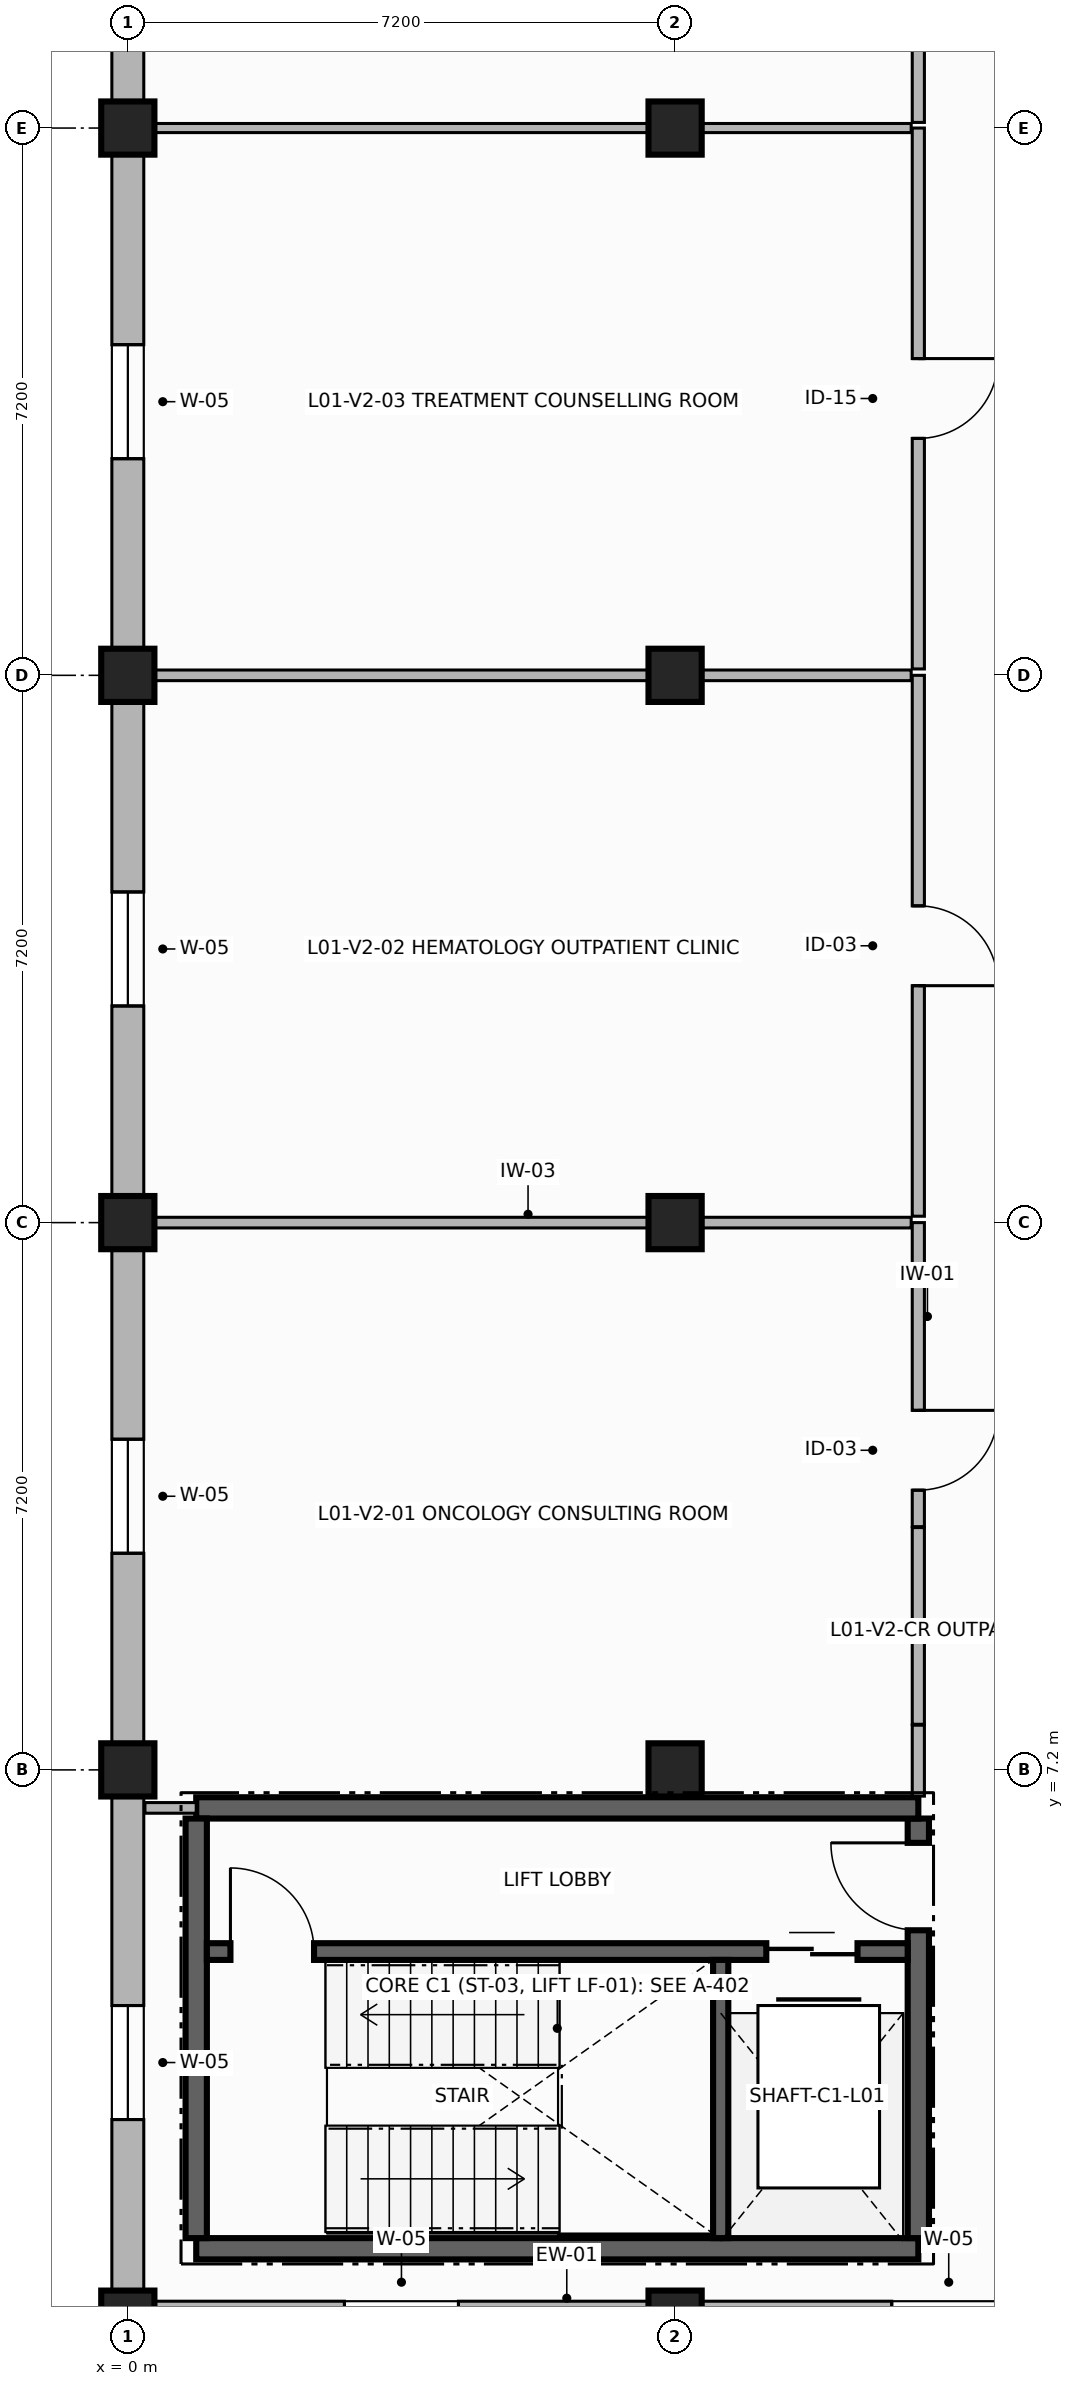
"""IFC4 building model, lengths in metres.
Left out: names, types, materials, properties, quantities, classifications, styles, units other than length and angle.
Written with IfcOpenShell. Run it as: python <this file> out.ifc"""

import sys

from ifc_helpers import new_model, si_unit, direction, frame, frame_2d, origin, origin_with_axes, origin_2d, place, context, subcontext, project, spatial, rectangle, extrude, element, fill, save


model = new_model("IFC4")
c1 = context("Model", 3, precision=1e-05, world=origin(), true_north=direction((0.0, 1.0)))
c2 = subcontext(c1, "Body", "Model", "MODEL_VIEW")
j1 = project(units=[si_unit("LENGTHUNIT", "METRE"), si_unit("PLANEANGLEUNIT", "RADIAN")], contexts=[c1])
p1 = place(None, origin())
s1 = spatial("IfcSite", under=j1, at=p1, CompositionType="ELEMENT")
p2 = place(p1, origin())
s2 = spatial("IfcBuilding", under=s1, at=p2, CompositionType="ELEMENT")
p3 = place(p2, frame((0.0, 0.0, 4.5)))
s3 = spatial("IfcBuildingStorey", under=s2, at=p3, CompositionType="ELEMENT", Elevation=4.5)
for number, where, z_axis, x_axis in (
    (1, (0.0, 0.0, 0.0), (0.0, 0.0, 1.0), (1.0, 0.0, 0.0)),
    (2, (0.0, 7.2, 0.0), (0.0, 0.0, 1.0), (1.0, 0.0, 0.0)),
    (3, (0.0, 14.4, 0.0), (0.0, 0.0, 1.0), (1.0, 0.0, 0.0)),
    (4, (0.0, 21.6, 0.0), (0.0, 0.0, 1.0), (1.0, 0.0, 0.0)),
    (5, (0.0, 28.8, 0.0), (0.0, 0.0, 1.0), (1.0, 0.0, 0.0)),
    (6, (7.2, 0.0, 0.0), (0.0, 0.0, 1.0), (1.0, 0.0, 0.0)),
    (7, (7.2, 7.2, 0.0), (0.0, 0.0, 1.0), (1.0, 0.0, 0.0)),
    (8, (7.2, 14.4, 0.0), (0.0, 0.0, 1.0), (1.0, 0.0, 0.0)),
    (9, (7.2, 21.6, 0.0), (0.0, 0.0, 1.0), (1.0, 0.0, 0.0)),
    (10, (7.2, 28.8, 0.0), (0.0, 0.0, 1.0), (1.0, 0.0, 0.0)),
):
    element("IfcColumn", number, at=place(p3, frame(where, z_axis=z_axis, x_axis=x_axis)), inside=s3, PredefinedType="COLUMN", context=c2, shape_type="SweptSolid", body=[
        extrude(rectangle(XDim=0.7, YDim=0.7, at=origin_2d()), origin(), (0.0, 0.0, 1.0), 3.62),
    ])
p4 = place(p3, origin_with_axes())
e11 = element("IfcWall", 11, at=p4, inside=s3, PredefinedType="SOLIDWALL", context=c2, shape_type="SweptSolid", body=[
    extrude(rectangle(XDim=7.2, YDim=0.42, at=frame_2d((3.6, 0.0))), origin(), (0.0, 0.0, 1.0), 3.0),
])
p5 = place(p4, frame((2.85, 0.0, 0.85)))
e12 = element("IfcOpeningElement", 12, at=p5, cuts=e11, PredefinedType="OPENING", context=c2, shape_type="SweptSolid", body=[
    extrude(rectangle(XDim=1.5, YDim=1.9, at=frame_2d((0.75, 0.95))), frame((0.0, 0.22, 0.0), z_axis=(0.0, -1.0, 0.0), x_axis=(1.0, 0.0, 0.0)), (0.0, 0.0, 1.0), 0.44),
])
p6 = place(p3, frame((7.2, 0.0, 0.0), z_axis=(0.0, 0.0, 1.0), x_axis=(1.0, 0.0, 0.0)))
e13 = element("IfcWall", 13, at=p6, inside=s3, PredefinedType="SOLIDWALL", context=c2, shape_type="SweptSolid", body=[
    extrude(rectangle(XDim=7.2, YDim=0.42, at=frame_2d((3.6, 0.0))), origin(), (0.0, 0.0, 1.0), 3.0),
])
p7 = place(p6, frame((2.85, 0.0, 0.85)))
e14 = element("IfcOpeningElement", 14, at=p7, cuts=e13, PredefinedType="OPENING", context=c2, shape_type="SweptSolid", body=[
    extrude(rectangle(XDim=1.5, YDim=1.9, at=frame_2d((0.75, 0.95))), frame((0.0, 0.22, 0.0), z_axis=(0.0, -1.0, 0.0), x_axis=(1.0, 0.0, 0.0)), (0.0, 0.0, 1.0), 0.44),
])
p8 = place(p3, frame((0.0, 36.0, 0.0), z_axis=(0.0, 0.0, 1.0), x_axis=(0.0, -1.0, 0.0)))
e15 = element("IfcWall", 15, at=p8, inside=s3, PredefinedType="SOLIDWALL", context=c2, shape_type="SweptSolid", body=[
    extrude(rectangle(XDim=7.2, YDim=0.42, at=frame_2d((3.6, 0.0))), origin(), (0.0, 0.0, 1.0), 3.0),
])
p9 = place(p8, frame((2.85, 0.0, 0.85)))
e16 = element("IfcOpeningElement", 16, at=p9, cuts=e15, PredefinedType="OPENING", context=c2, shape_type="SweptSolid", body=[
    extrude(rectangle(XDim=1.5, YDim=1.9, at=frame_2d((0.75, 0.95))), frame((0.0, 0.22, 0.0), z_axis=(0.0, -1.0, 0.0), x_axis=(1.0, 0.0, 0.0)), (0.0, 0.0, 1.0), 0.44),
])
p10 = place(p3, frame((0.0, 28.8, 0.0), z_axis=(0.0, 0.0, 1.0), x_axis=(0.0, -1.0, 0.0)))
e17 = element("IfcWall", 17, at=p10, inside=s3, PredefinedType="SOLIDWALL", context=c2, shape_type="SweptSolid", body=[
    extrude(rectangle(XDim=7.2, YDim=0.42, at=frame_2d((3.6, 0.0))), origin(), (0.0, 0.0, 1.0), 3.0),
])
p11 = place(p10, frame((2.85, 0.0, 0.85)))
e18 = element("IfcOpeningElement", 18, at=p11, cuts=e17, PredefinedType="OPENING", context=c2, shape_type="SweptSolid", body=[
    extrude(rectangle(XDim=1.5, YDim=1.9, at=frame_2d((0.75, 0.95))), frame((0.0, 0.22, 0.0), z_axis=(0.0, -1.0, 0.0), x_axis=(1.0, 0.0, 0.0)), (0.0, 0.0, 1.0), 0.44),
])
p12 = place(p3, frame((0.0, 21.6, 0.0), z_axis=(0.0, 0.0, 1.0), x_axis=(0.0, -1.0, 0.0)))
e19 = element("IfcWall", 19, at=p12, inside=s3, PredefinedType="SOLIDWALL", context=c2, shape_type="SweptSolid", body=[
    extrude(rectangle(XDim=7.2, YDim=0.42, at=frame_2d((3.6, 0.0))), origin(), (0.0, 0.0, 1.0), 3.0),
])
p13 = place(p12, frame((2.85, 0.0, 0.85)))
e20 = element("IfcOpeningElement", 20, at=p13, cuts=e19, PredefinedType="OPENING", context=c2, shape_type="SweptSolid", body=[
    extrude(rectangle(XDim=1.5, YDim=1.9, at=frame_2d((0.75, 0.95))), frame((0.0, 0.22, 0.0), z_axis=(0.0, -1.0, 0.0), x_axis=(1.0, 0.0, 0.0)), (0.0, 0.0, 1.0), 0.44),
])
p14 = place(p3, frame((0.0, 14.4, 0.0), z_axis=(0.0, 0.0, 1.0), x_axis=(0.0, -1.0, 0.0)))
e21 = element("IfcWall", 21, at=p14, inside=s3, PredefinedType="SOLIDWALL", context=c2, shape_type="SweptSolid", body=[
    extrude(rectangle(XDim=7.2, YDim=0.42, at=frame_2d((3.6, 0.0))), origin(), (0.0, 0.0, 1.0), 3.0),
])
p15 = place(p14, frame((2.85, 0.0, 0.85)))
e22 = element("IfcOpeningElement", 22, at=p15, cuts=e21, PredefinedType="OPENING", context=c2, shape_type="SweptSolid", body=[
    extrude(rectangle(XDim=1.5, YDim=1.9, at=frame_2d((0.75, 0.95))), frame((0.0, 0.22, 0.0), z_axis=(0.0, -1.0, 0.0), x_axis=(1.0, 0.0, 0.0)), (0.0, 0.0, 1.0), 0.44),
])
p16 = place(p3, frame((0.0, 7.2, 0.0), z_axis=(0.0, 0.0, 1.0), x_axis=(0.0, -1.0, 0.0)))
e23 = element("IfcWall", 23, at=p16, inside=s3, PredefinedType="SOLIDWALL", context=c2, shape_type="SweptSolid", body=[
    extrude(rectangle(XDim=7.2, YDim=0.42, at=frame_2d((3.6, 0.0))), origin(), (0.0, 0.0, 1.0), 3.0),
])
p17 = place(p16, frame((3.1, 0.0, 0.85)))
e24 = element("IfcOpeningElement", 24, at=p17, cuts=e23, PredefinedType="OPENING", context=c2, shape_type="SweptSolid", body=[
    extrude(rectangle(XDim=1.5, YDim=1.9, at=frame_2d((0.75, 0.95))), frame((0.0, 0.22, 0.0), z_axis=(0.0, -1.0, 0.0), x_axis=(1.0, 0.0, 0.0)), (0.0, 0.0, 1.0), 0.44),
])
p18 = place(p3, frame((0.9, 0.9, 0.0), z_axis=(0.0, 0.0, 1.0), x_axis=(1.0, 0.0, 0.0)))
e25 = element("IfcWall", 25, at=p18, inside=s3, PredefinedType="SHEAR", context=c2, shape_type="SweptSolid", body=[
    extrude(rectangle(XDim=9.5, YDim=0.28, at=frame_2d((4.75, 0.0))), origin(), (0.0, 0.0, 1.0), 3.62),
])
p19 = place(p3, frame((10.4, 1.04, 0.0), z_axis=(0.0, 0.0, 1.0), x_axis=(0.0, 1.0, 0.0)))
e26 = element("IfcWall", 26, at=p19, inside=s3, PredefinedType="SHEAR", context=c2, shape_type="SweptSolid", body=[
    extrude(rectangle(XDim=5.52, YDim=0.28, at=frame_2d((2.76, 0.0))), origin(), (0.0, 0.0, 1.0), 3.62),
])
p20 = place(p19, frame((4.05, 0.0, 0.0)))
e27 = element("IfcOpeningElement", 27, at=p20, cuts=e26, PredefinedType="OPENING", context=c2, shape_type="SweptSolid", body=[
    extrude(rectangle(XDim=1.15, YDim=2.2, at=frame_2d((0.575, 1.1))), frame((0.0, 0.15, 0.0), z_axis=(0.0, -1.0, 0.0), x_axis=(1.0, 0.0, 0.0)), (0.0, 0.0, 1.0), 0.3),
])
p21 = place(p3, frame((10.4, 6.7, 0.0), z_axis=(0.0, 0.0, 1.0), x_axis=(-1.0, 0.0, 0.0)))
e28 = element("IfcWall", 28, at=p21, inside=s3, PredefinedType="SHEAR", context=c2, shape_type="SweptSolid", body=[
    extrude(rectangle(XDim=9.5, YDim=0.28, at=frame_2d((4.75, 0.0))), origin(), (0.0, 0.0, 1.0), 3.62),
])
p22 = place(p3, frame((0.9, 6.56, 0.0), z_axis=(0.0, 0.0, 1.0), x_axis=(0.0, -1.0, 0.0)))
e29 = element("IfcWall", 29, at=p22, inside=s3, PredefinedType="SHEAR", context=c2, shape_type="SweptSolid", body=[
    extrude(rectangle(XDim=5.52, YDim=0.28, at=frame_2d((2.76, 0.0))), origin(), (0.0, 0.0, 1.0), 3.62),
])
p23 = place(p3, frame((1.04, 4.81, 0.0), z_axis=(0.0, 0.0, 1.0), x_axis=(1.0, 0.0, 0.0)))
e30 = element("IfcWall", 30, at=p23, inside=s3, PredefinedType="SHEAR", context=c2, shape_type="SweptSolid", body=[
    extrude(rectangle(XDim=9.22, YDim=0.22, at=frame_2d((4.61, 0.0))), origin(), (0.0, 0.0, 1.0), 3.62),
])
p24 = place(p23, frame((0.31, 0.0, 0.0)))
e31 = element("IfcOpeningElement", 31, at=p24, cuts=e30, PredefinedType="OPENING", context=c2, shape_type="SweptSolid", body=[
    extrude(rectangle(XDim=1.1, YDim=2.15, at=frame_2d((0.55, 1.075))), frame((0.0, 0.12, 0.0), z_axis=(0.0, -1.0, 0.0), x_axis=(1.0, 0.0, 0.0)), (0.0, 0.0, 1.0), 0.24),
])
p25 = place(p23, frame((7.36, 0.0, 0.0)))
e32 = element("IfcOpeningElement", 32, at=p25, cuts=e30, PredefinedType="OPENING", context=c2, shape_type="SweptSolid", body=[
    extrude(rectangle(XDim=1.2, YDim=2.2, at=frame_2d((0.6, 1.1))), frame((0.0, 0.12, 0.0), z_axis=(0.0, -1.0, 0.0), x_axis=(1.0, 0.0, 0.0)), (0.0, 0.0, 1.0), 0.24),
])
p26 = place(p3, frame((7.8, 1.04, 0.0), z_axis=(0.0, 0.0, 1.0), x_axis=(0.0, 1.0, 0.0)))
e33 = element("IfcWall", 33, at=p26, inside=s3, PredefinedType="SHEAR", context=c2, shape_type="SweptSolid", body=[
    extrude(rectangle(XDim=3.66, YDim=0.2, at=frame_2d((1.83, 0.0))), origin(), (0.0, 0.0, 1.0), 3.62),
])
p27 = place(p3, frame((10.4, 14.4, 0.0), z_axis=(0.0, 0.0, 1.0), x_axis=(0.0, -1.0, 0.0)))
e34 = element("IfcWall", 34, at=p27, inside=s3, PredefinedType="PARTITIONING", context=c2, shape_type="SweptSolid", body=[
    extrude(rectangle(XDim=4.0, YDim=0.16, at=frame_2d((2.0, 0.0))), origin(), (0.0, 0.0, 1.0), 2.98),
])
p28 = place(p27, frame((2.47, 0.0, 0.0)))
e35 = element("IfcOpeningElement", 35, at=p28, cuts=e34, PredefinedType="OPENING", context=c2, shape_type="SweptSolid", body=[
    extrude(rectangle(XDim=1.05, YDim=2.15, at=frame_2d((0.525, 1.075))), frame((0.0, 0.09, 0.0), z_axis=(0.0, -1.0, 0.0), x_axis=(1.0, 0.0, 0.0)), (0.0, 0.0, 1.0), 0.18),
])
p29 = place(p3, frame((10.4, 10.388, 0.0), z_axis=(0.0, 0.0, 1.0), x_axis=(0.0, -1.0, 0.0)))
e36 = element("IfcWall", 36, at=p29, inside=s3, PredefinedType="PARTITIONING", context=c2, shape_type="SweptSolid", body=[
    extrude(rectangle(XDim=2.588, YDim=0.16, at=frame_2d((1.294, 0.0))), origin(), (0.0, 0.0, 1.0), 2.98),
])
p30 = place(p3, frame((10.4, 7.788, 0.0), z_axis=(0.0, 0.0, 1.0), x_axis=(0.0, -1.0, 0.0)))
e37 = element("IfcWall", 37, at=p30, inside=s3, PredefinedType="PARTITIONING", context=c2, shape_type="SweptSolid", body=[
    extrude(rectangle(XDim=0.933, YDim=0.16, at=frame_2d((0.467, 0.0))), origin(), (0.0, 0.0, 1.0), 2.98),
])
p31 = place(p3, frame((0.9, 6.7, 0.0), z_axis=(0.0, 0.0, 1.0), x_axis=(-1.0, 0.0, 0.0)))
e38 = element("IfcWall", 38, at=p31, inside=s3, PredefinedType="PARTITIONING", context=c2, shape_type="SweptSolid", body=[
    extrude(rectangle(XDim=0.675, YDim=0.14, at=frame_2d((0.337, 0.0))), origin(), (0.0, 0.0, 1.0), 2.98),
])
p32 = place(p3, frame((0.225, 14.4, 0.0), z_axis=(0.0, 0.0, 1.0), x_axis=(1.0, 0.0, 0.0)))
e39 = element("IfcWall", 39, at=p32, inside=s3, PredefinedType="PARTITIONING", context=c2, shape_type="SweptSolid", body=[
    extrude(rectangle(XDim=10.081, YDim=0.14, at=frame_2d((5.041, 0.0))), origin(), (0.0, 0.0, 1.0), 2.98),
])
p33 = place(p3, frame((10.4, 21.6, 0.0), z_axis=(0.0, 0.0, 1.0), x_axis=(0.0, -1.0, 0.0)))
e40 = element("IfcWall", 40, at=p33, inside=s3, PredefinedType="PARTITIONING", context=c2, shape_type="SweptSolid", body=[
    extrude(rectangle(XDim=7.116, YDim=0.16, at=frame_2d((3.558, 0.0))), origin(), (0.0, 0.0, 1.0), 2.98),
])
p34 = place(p33, frame((3.033, 0.0, 0.0)))
e41 = element("IfcOpeningElement", 41, at=p34, cuts=e40, PredefinedType="OPENING", context=c2, shape_type="SweptSolid", body=[
    extrude(rectangle(XDim=1.05, YDim=2.15, at=frame_2d((0.525, 1.075))), frame((0.0, 0.09, 0.0), z_axis=(0.0, -1.0, 0.0), x_axis=(1.0, 0.0, 0.0)), (0.0, 0.0, 1.0), 0.18),
])
p35 = place(p3, frame((0.225, 21.6, 0.0), z_axis=(0.0, 0.0, 1.0), x_axis=(1.0, 0.0, 0.0)))
e42 = element("IfcWall", 42, at=p35, inside=s3, PredefinedType="PARTITIONING", context=c2, shape_type="SweptSolid", body=[
    extrude(rectangle(XDim=10.081, YDim=0.14, at=frame_2d((5.041, 0.0))), origin(), (0.0, 0.0, 1.0), 2.98),
])
p36 = place(p3, frame((10.4, 28.8, 0.0), z_axis=(0.0, 0.0, 1.0), x_axis=(0.0, -1.0, 0.0)))
e43 = element("IfcWall", 43, at=p36, inside=s3, PredefinedType="PARTITIONING", context=c2, shape_type="SweptSolid", body=[
    extrude(rectangle(XDim=7.116, YDim=0.16, at=frame_2d((3.558, 0.0))), origin(), (0.0, 0.0, 1.0), 2.98),
])
p37 = place(p36, frame((3.033, 0.0, 0.0)))
e44 = element("IfcOpeningElement", 44, at=p37, cuts=e43, PredefinedType="OPENING", context=c2, shape_type="SweptSolid", body=[
    extrude(rectangle(XDim=1.05, YDim=2.2, at=frame_2d((0.525, 1.1))), frame((0.0, 0.09, 0.0), z_axis=(0.0, -1.0, 0.0), x_axis=(1.0, 0.0, 0.0)), (0.0, 0.0, 1.0), 0.18),
])
p38 = place(p3, frame((0.225, 28.8, 0.0), z_axis=(0.0, 0.0, 1.0), x_axis=(1.0, 0.0, 0.0)))
e45 = element("IfcWall", 45, at=p38, inside=s3, PredefinedType="PARTITIONING", context=c2, shape_type="SweptSolid", body=[
    extrude(rectangle(XDim=10.081, YDim=0.12, at=frame_2d((5.041, 0.0))), origin(), (0.0, 0.0, 1.0), 2.98),
])
p39 = place(p3, frame((10.4, 36.645, 0.0), z_axis=(0.0, 0.0, 1.0), x_axis=(0.0, -1.0, 0.0)))
e46 = element("IfcWall", 46, at=p39, inside=s3, PredefinedType="PARTITIONING", context=c2, shape_type="SweptSolid", body=[
    extrude(rectangle(XDim=7.771, YDim=0.16, at=frame_2d((3.885, 0.0))), origin(), (0.0, 0.0, 1.0), 2.98),
])
p40 = place(p39, frame((3.538, 0.0, 0.0)))
e47 = element("IfcOpeningElement", 47, at=p40, cuts=e46, PredefinedType="OPENING", context=c2, shape_type="SweptSolid", body=[
    extrude(rectangle(XDim=1.4, YDim=2.3, at=frame_2d((0.7, 1.15))), frame((0.0, 0.09, 0.0), z_axis=(0.0, -1.0, 0.0), x_axis=(1.0, 0.0, 0.0)), (0.0, 0.0, 1.0), 0.18),
])
p41 = place(p11, origin())
e48 = element("IfcWindow", 48, at=p41, inside=s3, PartitioningType="SINGLE_PANEL", PredefinedType="WINDOW", context=c2, shape_type="SweptSolid", body=[
    extrude(rectangle(XDim=1.5, YDim=1.9, at=frame_2d((0.75, 0.95))), frame((0.0, 0.03, 0.0), z_axis=(0.0, -1.0, 0.0), x_axis=(1.0, 0.0, 0.0)), (0.0, 0.0, 1.0), 0.06),
])
fill(e18, e48)
p42 = place(p13, origin())
e49 = element("IfcWindow", 49, at=p42, inside=s3, PartitioningType="SINGLE_PANEL", PredefinedType="WINDOW", context=c2, shape_type="SweptSolid", body=[
    extrude(rectangle(XDim=1.5, YDim=1.9, at=frame_2d((0.75, 0.95))), frame((0.0, 0.03, 0.0), z_axis=(0.0, -1.0, 0.0), x_axis=(1.0, 0.0, 0.0)), (0.0, 0.0, 1.0), 0.06),
])
fill(e20, e49)
p43 = place(p15, origin())
e50 = element("IfcWindow", 50, at=p43, inside=s3, PartitioningType="SINGLE_PANEL", PredefinedType="WINDOW", context=c2, shape_type="SweptSolid", body=[
    extrude(rectangle(XDim=1.5, YDim=1.9, at=frame_2d((0.75, 0.95))), frame((0.0, 0.03, 0.0), z_axis=(0.0, -1.0, 0.0), x_axis=(1.0, 0.0, 0.0)), (0.0, 0.0, 1.0), 0.06),
])
fill(e22, e50)
p44 = place(p17, origin())
e51 = element("IfcWindow", 51, at=p44, inside=s3, PartitioningType="SINGLE_PANEL", PredefinedType="WINDOW", context=c2, shape_type="SweptSolid", body=[
    extrude(rectangle(XDim=1.5, YDim=1.9, at=frame_2d((0.75, 0.95))), frame((0.0, 0.03, 0.0), z_axis=(0.0, -1.0, 0.0), x_axis=(1.0, 0.0, 0.0)), (0.0, 0.0, 1.0), 0.06),
])
fill(e24, e51)
p45 = place(p24, origin())
e52 = element("IfcDoor", 52, at=p45, inside=s3, OperationType="SINGLE_SWING_LEFT", PredefinedType="DOOR", context=c2, shape_type="SweptSolid", body=[
    extrude(rectangle(XDim=1.1, YDim=2.15, at=frame_2d((0.55, 1.075))), frame((0.0, 0.025, 0.0), z_axis=(0.0, -1.0, 0.0), x_axis=(1.0, 0.0, 0.0)), (0.0, 0.0, 1.0), 0.05),
])
fill(e31, e52)
p46 = place(p25, origin())
e53 = element("IfcDoor", 53, at=p46, inside=s3, OperationType="DOUBLE_DOOR_SLIDING", PredefinedType="DOOR", context=c2, shape_type="SweptSolid", body=[
    extrude(rectangle(XDim=1.2, YDim=2.2, at=frame_2d((0.6, 1.1))), frame((0.0, 0.025, 0.0), z_axis=(0.0, -1.0, 0.0), x_axis=(1.0, 0.0, 0.0)), (0.0, 0.0, 1.0), 0.05),
])
fill(e32, e53)
p47 = place(p20, origin())
e54 = element("IfcDoor", 54, at=p47, inside=s3, OperationType="SINGLE_SWING_RIGHT", PredefinedType="DOOR", context=c2, shape_type="SweptSolid", body=[
    extrude(rectangle(XDim=1.15, YDim=2.2, at=frame_2d((0.575, 1.1))), frame((0.0, 0.025, 0.0), z_axis=(0.0, -1.0, 0.0), x_axis=(1.0, 0.0, 0.0)), (0.0, 0.0, 1.0), 0.05),
])
fill(e27, e54)
p48 = place(p28, origin())
e55 = element("IfcDoor", 55, at=p48, inside=s3, OperationType="SINGLE_SWING_LEFT", PredefinedType="DOOR", context=c2, shape_type="SweptSolid", body=[
    extrude(rectangle(XDim=1.05, YDim=2.15, at=frame_2d((0.525, 1.075))), frame((0.0, 0.025, 0.0), z_axis=(0.0, -1.0, 0.0), x_axis=(1.0, 0.0, 0.0)), (0.0, 0.0, 1.0), 0.05),
])
fill(e35, e55)
p49 = place(p34, origin())
e56 = element("IfcDoor", 56, at=p49, inside=s3, OperationType="SINGLE_SWING_RIGHT", PredefinedType="DOOR", context=c2, shape_type="SweptSolid", body=[
    extrude(rectangle(XDim=1.05, YDim=2.15, at=frame_2d((0.525, 1.075))), frame((0.0, 0.025, 0.0), z_axis=(0.0, -1.0, 0.0), x_axis=(1.0, 0.0, 0.0)), (0.0, 0.0, 1.0), 0.05),
])
fill(e41, e56)
p50 = place(p37, origin())
e57 = element("IfcDoor", 57, at=p50, inside=s3, OperationType="SINGLE_SWING_LEFT", PredefinedType="DOOR", context=c2, shape_type="SweptSolid", body=[
    extrude(rectangle(XDim=1.05, YDim=2.2, at=frame_2d((0.525, 1.1))), frame((0.0, 0.025, 0.0), z_axis=(0.0, -1.0, 0.0), x_axis=(1.0, 0.0, 0.0)), (0.0, 0.0, 1.0), 0.05),
])
fill(e44, e57)
save(model, sys.argv[1])
